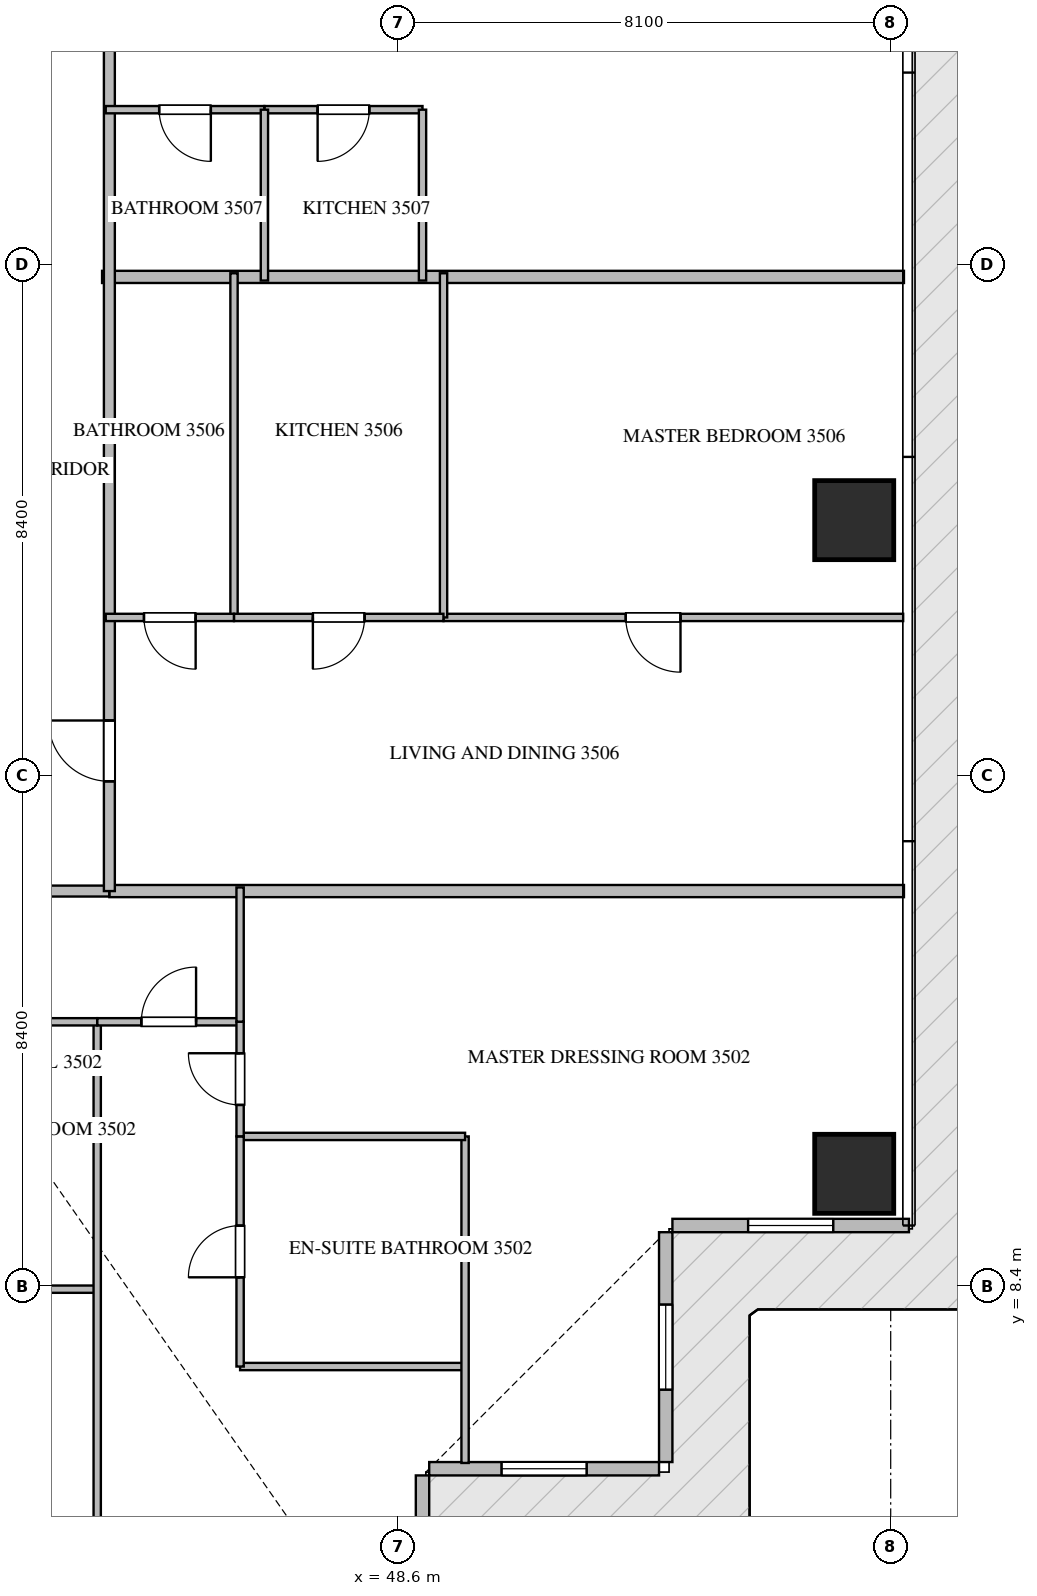
"""IFC4 building model, lengths in metres.
Left out: names, types, materials, properties, quantities, classifications, styles, units other than length and angle.
Written with IfcOpenShell. Run it as: python <this file> out.ifc"""

import sys

from ifc_helpers import new_model, si_unit, direction, frame, frame_2d, origin, origin_2d, place, context, subcontext, project, spatial, rectangle, extrude, source, transform, mapped, element, fill, save


model = new_model("IFC4")
c1 = context("Model", 3, precision=1e-05, world=origin(), true_north=direction((0.0, 1.0)))
c2 = subcontext(c1, "Body", "Model", "MODEL_VIEW")
j1 = project(units=[si_unit("LENGTHUNIT", "METRE"), si_unit("PLANEANGLEUNIT", "RADIAN")], contexts=[c1])
p1 = place(None, origin())
s1 = spatial("IfcSite", under=j1, at=p1, CompositionType="ELEMENT")
p2 = place(p1, origin())
s2 = spatial("IfcBuilding", under=s1, at=p2, CompositionType="ELEMENT")
p3 = place(p2, frame((0.0, 0.0, 142.65)))
s3 = spatial("IfcBuildingStorey", under=s2, at=p3, CompositionType="ELEMENT", Elevation=142.65)
m1 = source(origin(), c2, "Body", "SweptSolid", [
    extrude(rectangle(XDim=1.3, YDim=1.3, at=origin_2d()), origin(), (0.0, 0.0, 1.0), 3.75),
])
for number, where, z_axis, x_axis in (
    (1, (56.1, 10.25, -0.26), (0.0, 0.0, 1.0), (1.0, 0.0, 0.0)),
    (2, (56.1, 21.0, -0.26), (0.0, 0.0, 1.0), (1.0, 0.0, 0.0)),
):
    element("IfcColumn", number, at=place(p3, frame(where, z_axis=z_axis, x_axis=x_axis)), inside=s3, PredefinedType="COLUMN", context=c2, shape_type="MappedRepresentation", body=[
        mapped(m1, transform((0.0, 0.0, 0.0), scale=1.0)),
    ])
p4 = place(p3, frame((49.0, 1.4, 0.0), z_axis=(0.0, 0.0, 1.0), x_axis=(0.0, 1.0, 0.0)))
e3 = element("IfcWall", 3, at=p4, inside=s3, PredefinedType="ELEMENTEDWALL", context=c2, shape_type="SweptSolid", body=[
    extrude(rectangle(XDim=3.89, YDim=0.22, at=frame_2d((1.945, 0.0))), origin(), (0.0, 0.0, 1.0), 3.475),
])
p5 = place(p4, frame((1.245, 0.0, 0.65)))
e4 = element("IfcOpeningElement", 4, at=p5, cuts=e3, PredefinedType="OPENING", context=c2, shape_type="SweptSolid", body=[
    extrude(rectangle(XDim=1.4, YDim=2.05, at=frame_2d((0.7, 1.025))), frame((0.0, 0.12, 0.0), z_axis=(0.0, -1.0, 0.0), x_axis=(1.0, 0.0, 0.0)), (0.0, 0.0, 1.0), 0.24),
])
p6 = place(p3, frame((49.11, 5.4, 0.0), z_axis=(0.0, 0.0, 1.0), x_axis=(1.0, 0.0, 0.0)))
e5 = element("IfcWall", 5, at=p6, inside=s3, PredefinedType="ELEMENTEDWALL", context=c2, shape_type="SweptSolid", body=[
    extrude(rectangle(XDim=3.78, YDim=0.22, at=frame_2d((1.89, 0.0))), origin(), (0.0, 0.0, 1.0), 3.475),
])
p7 = place(p6, frame((1.19, 0.0, 0.65)))
e6 = element("IfcOpeningElement", 6, at=p7, cuts=e5, PredefinedType="OPENING", context=c2, shape_type="SweptSolid", body=[
    extrude(rectangle(XDim=1.4, YDim=2.05, at=frame_2d((0.7, 1.025))), frame((0.0, 0.12, 0.0), z_axis=(0.0, -1.0, 0.0), x_axis=(1.0, 0.0, 0.0)), (0.0, 0.0, 1.0), 0.24),
])
p8 = place(p3, frame((53.0, 5.51, 0.0), z_axis=(0.0, 0.0, 1.0), x_axis=(0.0, 1.0, 0.0)))
e7 = element("IfcWall", 7, at=p8, inside=s3, PredefinedType="ELEMENTEDWALL", context=c2, shape_type="SweptSolid", body=[
    extrude(rectangle(XDim=3.78, YDim=0.22, at=frame_2d((1.89, 0.0))), origin(), (0.0, 0.0, 1.0), 3.475),
])
p9 = place(p8, frame((1.19, 0.0, 0.65)))
e8 = element("IfcOpeningElement", 8, at=p9, cuts=e7, PredefinedType="OPENING", context=c2, shape_type="SweptSolid", body=[
    extrude(rectangle(XDim=1.4, YDim=2.05, at=frame_2d((0.7, 1.025))), frame((0.0, 0.12, 0.0), z_axis=(0.0, -1.0, 0.0), x_axis=(1.0, 0.0, 0.0)), (0.0, 0.0, 1.0), 0.24),
])
p10 = place(p3, frame((53.11, 9.4, 0.0), z_axis=(0.0, 0.0, 1.0), x_axis=(1.0, 0.0, 0.0)))
e9 = element("IfcWall", 9, at=p10, inside=s3, PredefinedType="ELEMENTEDWALL", context=c2, shape_type="SweptSolid", body=[
    extrude(rectangle(XDim=3.89, YDim=0.22, at=frame_2d((1.945, 0.0))), origin(), (0.0, 0.0, 1.0), 3.475),
])
p11 = place(p10, frame((1.245, 0.0, 0.65)))
e10 = element("IfcOpeningElement", 10, at=p11, cuts=e9, PredefinedType="OPENING", context=c2, shape_type="SweptSolid", body=[
    extrude(rectangle(XDim=1.4, YDim=2.05, at=frame_2d((0.7, 1.025))), frame((0.0, 0.12, 0.0), z_axis=(0.0, -1.0, 0.0), x_axis=(1.0, 0.0, 0.0)), (0.0, 0.0, 1.0), 0.24),
])
p12 = place(p3, frame((43.73, 25.0, 0.0), z_axis=(0.0, 0.0, 1.0), x_axis=(1.0, 0.0, 0.0)))
e11 = element("IfcWall", 11, at=p12, inside=s3, PredefinedType="PARTITIONING", context=c2, shape_type="SweptSolid", body=[
    extrude(rectangle(XDim=13.188, YDim=0.2, at=frame_2d((6.594, 0.0))), origin(), (0.0, 0.0, 1.0), 3.49),
])
p13 = place(p3, frame((43.85, 14.9, 0.0), z_axis=(0.0, 0.0, 1.0), x_axis=(1.0, 0.0, 0.0)))
e12 = element("IfcWall", 12, at=p13, inside=s3, PredefinedType="PARTITIONING", context=c2, shape_type="SweptSolid", body=[
    extrude(rectangle(XDim=13.068, YDim=0.2, at=frame_2d((6.534, 0.0))), origin(), (0.0, 0.0, 1.0), 3.49),
])
p14 = place(p3, frame((20.952, 14.9, 0.0), z_axis=(0.0, 0.0, 1.0), x_axis=(1.0, 0.0, 0.0)))
e13 = element("IfcWall", 13, at=p14, inside=s3, PredefinedType="PARTITIONING", context=c2, shape_type="SweptSolid", body=[
    extrude(rectangle(XDim=22.896, YDim=0.18, at=frame_2d((11.448, 0.0))), origin(), (0.0, 0.0, 1.0), 3.49),
])
p15 = place(p14, frame((5.386, 0.0, 0.0)))
e14 = element("IfcOpeningElement", 14, at=p15, cuts=e13, PredefinedType="OPENING", context=c2, shape_type="SweptSolid", body=[
    extrude(rectangle(XDim=1.0, YDim=2.15, at=frame_2d((0.5, 1.075))), frame((0.0, 0.1, 0.0), z_axis=(0.0, -1.0, 0.0), x_axis=(1.0, 0.0, 0.0)), (0.0, 0.0, 1.0), 0.2),
])
p16 = place(p14, frame((10.948, 0.0, 0.0)))
e15 = element("IfcOpeningElement", 15, at=p16, cuts=e13, PredefinedType="OPENING", context=c2, shape_type="SweptSolid", body=[
    extrude(rectangle(XDim=1.0, YDim=2.15, at=frame_2d((0.5, 1.075))), frame((0.0, 0.1, 0.0), z_axis=(0.0, -1.0, 0.0), x_axis=(1.0, 0.0, 0.0)), (0.0, 0.0, 1.0), 0.2),
])
p17 = place(p3, frame((43.85, 14.9, 0.0), z_axis=(0.0, 0.0, 1.0), x_axis=(0.0, 1.0, 0.0)))
e16 = element("IfcWall", 16, at=p17, inside=s3, PredefinedType="PARTITIONING", context=c2, shape_type="SweptSolid", body=[
    extrude(rectangle(XDim=18.7, YDim=0.18, at=frame_2d((9.35, 0.0))), origin(), (0.0, 0.0, 1.0), 3.49),
])
p18 = place(p17, frame((1.805, 0.0, 0.0)))
e17 = element("IfcOpeningElement", 17, at=p18, cuts=e16, PredefinedType="OPENING", context=c2, shape_type="SweptSolid", body=[
    extrude(rectangle(XDim=1.0, YDim=2.15, at=frame_2d((0.5, 1.075))), frame((0.0, 0.1, 0.0), z_axis=(0.0, -1.0, 0.0), x_axis=(1.0, 0.0, 0.0)), (0.0, 0.0, 1.0), 0.2),
])
p19 = place(p17, frame((15.222, 0.0, 0.0)))
e18 = element("IfcOpeningElement", 18, at=p19, cuts=e16, PredefinedType="OPENING", context=c2, shape_type="SweptSolid", body=[
    extrude(rectangle(XDim=1.0, YDim=2.15, at=frame_2d((0.5, 1.075))), frame((0.0, 0.1, 0.0), z_axis=(0.0, -1.0, 0.0), x_axis=(1.0, 0.0, 0.0)), (0.0, 0.0, 1.0), 0.2),
])
p20 = place(p3, frame((38.5, 8.353, 0.0), z_axis=(0.0, 0.0, 1.0), x_axis=(1.0, 0.0, 0.0)))
e19 = element("IfcWall", 19, at=p20, inside=s3, PredefinedType="PARTITIONING", context=c2, shape_type="SweptSolid", body=[
    extrude(rectangle(XDim=5.15, YDim=0.12, at=frame_2d((2.575, 0.0))), origin(), (0.0, 0.0, 1.0), 3.49),
])
p21 = place(p3, frame((43.65, 1.495, 0.0), z_axis=(0.0, 0.0, 1.0), x_axis=(0.0, 1.0, 0.0)))
e20 = element("IfcWall", 20, at=p21, inside=s3, PredefinedType="PARTITIONING", context=c2, shape_type="SweptSolid", body=[
    extrude(rectangle(XDim=11.255, YDim=0.12, at=frame_2d((5.627, 0.0))), origin(), (0.0, 0.0, 1.0), 3.49),
])
p22 = place(p3, frame((40.665, 12.75, 0.0), z_axis=(0.0, 0.0, 1.0), x_axis=(1.0, 0.0, 0.0)))
e21 = element("IfcWall", 21, at=p22, inside=s3, PredefinedType="PARTITIONING", context=c2, shape_type="SweptSolid", body=[
    extrude(rectangle(XDim=2.985, YDim=0.12, at=frame_2d((1.492, 0.0))), origin(), (0.0, 0.0, 1.0), 3.49),
])
p23 = place(p22, frame((1.067, 0.0, 0.0)))
e22 = element("IfcOpeningElement", 22, at=p23, cuts=e21, PredefinedType="OPENING", context=c2, shape_type="SweptSolid", body=[
    extrude(rectangle(XDim=0.85, YDim=2.1, at=frame_2d((0.425, 1.05))), frame((0.0, 0.07, 0.0), z_axis=(0.0, -1.0, 0.0), x_axis=(1.0, 0.0, 0.0)), (0.0, 0.0, 1.0), 0.14),
])
p24 = place(p3, frame((43.652, 12.75, 0.0), z_axis=(0.0, 0.0, 1.0), x_axis=(1.0, 0.0, 0.0)))
e23 = element("IfcWall", 23, at=p24, inside=s3, PredefinedType="PARTITIONING", context=c2, shape_type="SweptSolid", body=[
    extrude(rectangle(XDim=2.348, YDim=0.12, at=frame_2d((1.174, 0.0))), origin(), (0.0, 0.0, 1.0), 3.49),
])
p25 = place(p24, frame((0.724, 0.0, 0.0)))
e24 = element("IfcOpeningElement", 24, at=p25, cuts=e23, PredefinedType="OPENING", context=c2, shape_type="SweptSolid", body=[
    extrude(rectangle(XDim=0.9, YDim=2.1, at=frame_2d((0.45, 1.05))), frame((0.0, 0.07, 0.0), z_axis=(0.0, -1.0, 0.0), x_axis=(1.0, 0.0, 0.0)), (0.0, 0.0, 1.0), 0.14),
])
p26 = place(p3, frame((46.0, 7.081, 0.0), z_axis=(0.0, 0.0, 1.0), x_axis=(1.0, 0.0, 0.0)))
e25 = element("IfcWall", 25, at=p26, inside=s3, PredefinedType="PARTITIONING", context=c2, shape_type="SweptSolid", body=[
    extrude(rectangle(XDim=3.7, YDim=0.12, at=frame_2d((1.85, 0.0))), origin(), (0.0, 0.0, 1.0), 3.49),
])
p27 = place(p3, frame((49.7, 5.495, 0.0), z_axis=(0.0, 0.0, 1.0), x_axis=(0.0, 1.0, 0.0)))
e26 = element("IfcWall", 26, at=p27, inside=s3, PredefinedType="PARTITIONING", context=c2, shape_type="SweptSolid", body=[
    extrude(rectangle(XDim=5.37, YDim=0.12, at=frame_2d((2.685, 0.0))), origin(), (0.0, 0.0, 1.0), 3.49),
])
p28 = place(p3, frame((46.0, 10.865, 0.0), z_axis=(0.0, 0.0, 1.0), x_axis=(1.0, 0.0, 0.0)))
e27 = element("IfcWall", 27, at=p28, inside=s3, PredefinedType="PARTITIONING", context=c2, shape_type="SweptSolid", body=[
    extrude(rectangle(XDim=3.7, YDim=0.12, at=frame_2d((1.85, 0.0))), origin(), (0.0, 0.0, 1.0), 3.49),
])
p29 = place(p3, frame((46.0, 7.081, 0.0), z_axis=(0.0, 0.0, 1.0), x_axis=(0.0, 1.0, 0.0)))
e28 = element("IfcWall", 28, at=p29, inside=s3, PredefinedType="PARTITIONING", context=c2, shape_type="SweptSolid", body=[
    extrude(rectangle(XDim=3.784, YDim=0.12, at=frame_2d((1.892, 0.0))), origin(), (0.0, 0.0, 1.0), 3.49),
])
p30 = place(p29, frame((1.467, 0.0, 0.0)))
e29 = element("IfcOpeningElement", 29, at=p30, cuts=e28, PredefinedType="OPENING", context=c2, shape_type="SweptSolid", body=[
    extrude(rectangle(XDim=0.85, YDim=2.1, at=frame_2d((0.425, 1.05))), frame((0.0, 0.07, 0.0), z_axis=(0.0, -1.0, 0.0), x_axis=(1.0, 0.0, 0.0)), (0.0, 0.0, 1.0), 0.14),
])
p31 = place(p3, frame((46.0, 10.867, 0.0), z_axis=(0.0, 0.0, 1.0), x_axis=(0.0, 1.0, 0.0)))
e30 = element("IfcWall", 30, at=p31, inside=s3, PredefinedType="PARTITIONING", context=c2, shape_type="SweptSolid", body=[
    extrude(rectangle(XDim=1.883, YDim=0.12, at=frame_2d((0.941, 0.0))), origin(), (0.0, 0.0, 1.0), 3.49),
])
p32 = place(p31, frame((0.516, 0.0, 0.0)))
e31 = element("IfcOpeningElement", 31, at=p32, cuts=e30, PredefinedType="OPENING", context=c2, shape_type="SweptSolid", body=[
    extrude(rectangle(XDim=0.85, YDim=2.1, at=frame_2d((0.425, 1.05))), frame((0.0, 0.07, 0.0), z_axis=(0.0, -1.0, 0.0), x_axis=(1.0, 0.0, 0.0)), (0.0, 0.0, 1.0), 0.14),
])
p33 = place(p3, frame((46.0, 12.752, 0.0), z_axis=(0.0, 0.0, 1.0), x_axis=(0.0, 1.0, 0.0)))
e32 = element("IfcWall", 32, at=p33, inside=s3, PredefinedType="PARTITIONING", context=c2, shape_type="SweptSolid", body=[
    extrude(rectangle(XDim=2.208, YDim=0.12, at=frame_2d((1.104, 0.0))), origin(), (0.0, 0.0, 1.0), 3.49),
])
p34 = place(p3, frame((56.905, 19.4, 0.0), z_axis=(0.0, 0.0, 1.0), x_axis=(-1.0, 0.0, 0.0)))
e33 = element("IfcWall", 33, at=p34, inside=s3, PredefinedType="PARTITIONING", context=c2, shape_type="SweptSolid", body=[
    extrude(rectangle(XDim=7.559, YDim=0.12, at=frame_2d((3.78, 0.0))), origin(), (0.0, 0.0, 1.0), 3.49),
])
p35 = place(p34, frame((3.662, 0.0, 0.0)))
e34 = element("IfcOpeningElement", 34, at=p35, cuts=e33, PredefinedType="OPENING", context=c2, shape_type="SweptSolid", body=[
    extrude(rectangle(XDim=0.9, YDim=2.1, at=frame_2d((0.45, 1.05))), frame((0.0, 0.07, 0.0), z_axis=(0.0, -1.0, 0.0), x_axis=(1.0, 0.0, 0.0)), (0.0, 0.0, 1.0), 0.14),
])
for number, where, z_axis, x_axis in (
    (35, (49.346, 19.4, 0.0), (0.0, 0.0, 1.0), (0.0, 1.0, 0.0)),
    (36, (45.9, 19.4, 0.0), (0.0, 0.0, 1.0), (0.0, 1.0, 0.0)),
):
    element("IfcWall", number, at=place(p3, frame(where, z_axis=z_axis, x_axis=x_axis)), inside=s3, PredefinedType="PARTITIONING", context=c2, shape_type="SweptSolid", body=[
        extrude(rectangle(XDim=5.66, YDim=0.12, at=frame_2d((2.83, 0.0))), origin(), (0.0, 0.0, 1.0), 3.49),
    ])
p36 = place(p3, frame((49.344, 19.4, 0.0), z_axis=(0.0, 0.0, 1.0), x_axis=(-1.0, 0.0, 0.0)))
e37 = element("IfcWall", 37, at=p36, inside=s3, PredefinedType="PARTITIONING", context=c2, shape_type="SweptSolid", body=[
    extrude(rectangle(XDim=3.444, YDim=0.12, at=frame_2d((1.722, 0.0))), origin(), (0.0, 0.0, 1.0), 3.49),
])
p37 = place(p36, frame((1.297, 0.0, 0.0)))
e38 = element("IfcOpeningElement", 38, at=p37, cuts=e37, PredefinedType="OPENING", context=c2, shape_type="SweptSolid", body=[
    extrude(rectangle(XDim=0.85, YDim=2.1, at=frame_2d((0.425, 1.05))), frame((0.0, 0.07, 0.0), z_axis=(0.0, -1.0, 0.0), x_axis=(1.0, 0.0, 0.0)), (0.0, 0.0, 1.0), 0.14),
])
p38 = place(p3, frame((45.898, 19.4, 0.0), z_axis=(0.0, 0.0, 1.0), x_axis=(-1.0, 0.0, 0.0)))
e39 = element("IfcWall", 39, at=p38, inside=s3, PredefinedType="PARTITIONING", context=c2, shape_type="SweptSolid", body=[
    extrude(rectangle(XDim=2.108, YDim=0.12, at=frame_2d((1.054, 0.0))), origin(), (0.0, 0.0, 1.0), 3.49),
])
p39 = place(p38, frame((0.629, 0.0, 0.0)))
e40 = element("IfcOpeningElement", 40, at=p39, cuts=e39, PredefinedType="OPENING", context=c2, shape_type="SweptSolid", body=[
    extrude(rectangle(XDim=0.85, YDim=2.1, at=frame_2d((0.425, 1.05))), frame((0.0, 0.07, 0.0), z_axis=(0.0, -1.0, 0.0), x_axis=(1.0, 0.0, 0.0)), (0.0, 0.0, 1.0), 0.14),
])
p40 = place(p3, frame((49.0, 27.75, 0.0), z_axis=(0.0, 0.0, 1.0), x_axis=(-1.0, 0.0, 0.0)))
e41 = element("IfcWall", 41, at=p40, inside=s3, PredefinedType="PARTITIONING", context=c2, shape_type="SweptSolid", body=[
    extrude(rectangle(XDim=2.6, YDim=0.12, at=frame_2d((1.3, 0.0))), origin(), (0.0, 0.0, 1.0), 3.49),
])
p41 = place(p40, frame((0.875, 0.0, 0.0)))
e42 = element("IfcOpeningElement", 42, at=p41, cuts=e41, PredefinedType="OPENING", context=c2, shape_type="SweptSolid", body=[
    extrude(rectangle(XDim=0.85, YDim=2.1, at=frame_2d((0.425, 1.05))), frame((0.0, 0.07, 0.0), z_axis=(0.0, -1.0, 0.0), x_axis=(1.0, 0.0, 0.0)), (0.0, 0.0, 1.0), 0.14),
])
p42 = place(p3, frame((46.398, 27.75, 0.0), z_axis=(0.0, 0.0, 1.0), x_axis=(-1.0, 0.0, 0.0)))
e43 = element("IfcWall", 43, at=p42, inside=s3, PredefinedType="PARTITIONING", context=c2, shape_type="SweptSolid", body=[
    extrude(rectangle(XDim=2.608, YDim=0.12, at=frame_2d((1.304, 0.0))), origin(), (0.0, 0.0, 1.0), 3.49),
])
p43 = place(p42, frame((0.879, 0.0, 0.0)))
e44 = element("IfcOpeningElement", 44, at=p43, cuts=e43, PredefinedType="OPENING", context=c2, shape_type="SweptSolid", body=[
    extrude(rectangle(XDim=0.85, YDim=2.1, at=frame_2d((0.425, 1.05))), frame((0.0, 0.07, 0.0), z_axis=(0.0, -1.0, 0.0), x_axis=(1.0, 0.0, 0.0)), (0.0, 0.0, 1.0), 0.14),
])
for number, where, z_axis, x_axis in (
    (45, (46.4, 24.94, 0.0), (0.0, 0.0, 1.0), (0.0, 1.0, 0.0)),
    (46, (49.0, 24.94, 0.0), (0.0, 0.0, 1.0), (0.0, 1.0, 0.0)),
):
    element("IfcWall", number, at=place(p3, frame(where, z_axis=z_axis, x_axis=x_axis)), inside=s3, PredefinedType="PARTITIONING", context=c2, shape_type="SweptSolid", body=[
        extrude(rectangle(XDim=2.81, YDim=0.12, at=frame_2d((1.405, 0.0))), origin(), (0.0, 0.0, 1.0), 3.49),
    ])
m2 = source(origin(), c2, "Body", "SweptSolid", [
    extrude(rectangle(XDim=1.4, YDim=2.05, at=frame_2d((0.7, 1.025))), frame((0.0, 0.03, 0.0), z_axis=(0.0, -1.0, 0.0), x_axis=(1.0, 0.0, 0.0)), (0.0, 0.0, 1.0), 0.06),
])
p44 = place(p7, origin())
e47 = element("IfcWindow", 47, at=p44, inside=s3, PartitioningType="SINGLE_PANEL", PredefinedType="WINDOW", context=c2, shape_type="MappedRepresentation", body=[
    mapped(m2, transform((0.0, 0.0, 0.0), scale=1.0)),
])
fill(e6, e47)
p45 = place(p9, origin())
e48 = element("IfcWindow", 48, at=p45, inside=s3, PartitioningType="SINGLE_PANEL", PredefinedType="WINDOW", context=c2, shape_type="MappedRepresentation", body=[
    mapped(m2, transform((0.0, 0.0, 0.0), scale=1.0)),
])
fill(e8, e48)
p46 = place(p11, origin())
e49 = element("IfcWindow", 49, at=p46, inside=s3, PartitioningType="SINGLE_PANEL", PredefinedType="WINDOW", context=c2, shape_type="MappedRepresentation", body=[
    mapped(m2, transform((0.0, 0.0, 0.0), scale=1.0)),
])
fill(e10, e49)
m3 = source(origin(), c2, "Body", "SweptSolid", [
    extrude(rectangle(XDim=1.0, YDim=2.15, at=frame_2d((0.5, 1.075))), frame((0.0, 0.025, 0.0), z_axis=(0.0, -1.0, 0.0), x_axis=(1.0, 0.0, 0.0)), (0.0, 0.0, 1.0), 0.05),
])
p47 = place(p18, origin())
e50 = element("IfcDoor", 50, at=p47, inside=s3, OperationType="SINGLE_SWING_RIGHT", PredefinedType="DOOR", context=c2, shape_type="MappedRepresentation", body=[
    mapped(m3, transform((0.0, 0.0, 0.0), scale=1.0)),
])
fill(e17, e50)
m4 = source(origin(), c2, "Body", "SweptSolid", [
    extrude(rectangle(XDim=0.9, YDim=2.1, at=frame_2d((0.45, 1.05))), frame((0.0, 0.025, 0.0), z_axis=(0.0, -1.0, 0.0), x_axis=(1.0, 0.0, 0.0)), (0.0, 0.0, 1.0), 0.05),
])
p48 = place(p25, origin())
e51 = element("IfcDoor", 51, at=p48, inside=s3, OperationType="SINGLE_SWING_RIGHT", PredefinedType="DOOR", context=c2, shape_type="MappedRepresentation", body=[
    mapped(m4, transform((0.0, 0.0, 0.0), scale=1.0)),
])
fill(e24, e51)
m5 = source(origin(), c2, "Body", "SweptSolid", [
    extrude(rectangle(XDim=0.85, YDim=2.1, at=frame_2d((0.425, 1.05))), frame((0.0, 0.025, 0.0), z_axis=(0.0, -1.0, 0.0), x_axis=(1.0, 0.0, 0.0)), (0.0, 0.0, 1.0), 0.05),
])
p49 = place(p30, origin())
e52 = element("IfcDoor", 52, at=p49, inside=s3, OperationType="SINGLE_SWING_LEFT", PredefinedType="DOOR", context=c2, shape_type="MappedRepresentation", body=[
    mapped(m5, transform((0.0, 0.0, 0.0), scale=1.0)),
])
fill(e29, e52)
p50 = place(p32, origin())
e53 = element("IfcDoor", 53, at=p50, inside=s3, OperationType="SINGLE_SWING_RIGHT", PredefinedType="DOOR", context=c2, shape_type="MappedRepresentation", body=[
    mapped(m5, transform((0.0, 0.0, 0.0), scale=1.0)),
])
fill(e31, e53)
p51 = place(p35, origin())
e54 = element("IfcDoor", 54, at=p51, inside=s3, OperationType="SINGLE_SWING_LEFT", PredefinedType="DOOR", context=c2, shape_type="MappedRepresentation", body=[
    mapped(m4, transform((0.0, 0.0, 0.0), scale=1.0)),
])
fill(e34, e54)
p52 = place(p37, origin())
e55 = element("IfcDoor", 55, at=p52, inside=s3, OperationType="SINGLE_SWING_RIGHT", PredefinedType="DOOR", context=c2, shape_type="MappedRepresentation", body=[
    mapped(m5, transform((0.0, 0.0, 0.0), scale=1.0)),
])
fill(e38, e55)
p53 = place(p39, origin())
e56 = element("IfcDoor", 56, at=p53, inside=s3, OperationType="SINGLE_SWING_LEFT", PredefinedType="DOOR", context=c2, shape_type="MappedRepresentation", body=[
    mapped(m5, transform((0.0, 0.0, 0.0), scale=1.0)),
])
fill(e40, e56)
p54 = place(p41, origin())
e57 = element("IfcDoor", 57, at=p54, inside=s3, OperationType="SINGLE_SWING_RIGHT", PredefinedType="DOOR", context=c2, shape_type="MappedRepresentation", body=[
    mapped(m5, transform((0.0, 0.0, 0.0), scale=1.0)),
])
fill(e42, e57)
p55 = place(p43, origin())
e58 = element("IfcDoor", 58, at=p55, inside=s3, OperationType="SINGLE_SWING_LEFT", PredefinedType="DOOR", context=c2, shape_type="MappedRepresentation", body=[
    mapped(m5, transform((0.0, 0.0, 0.0), scale=1.0)),
])
fill(e44, e58)
save(model, sys.argv[1])
